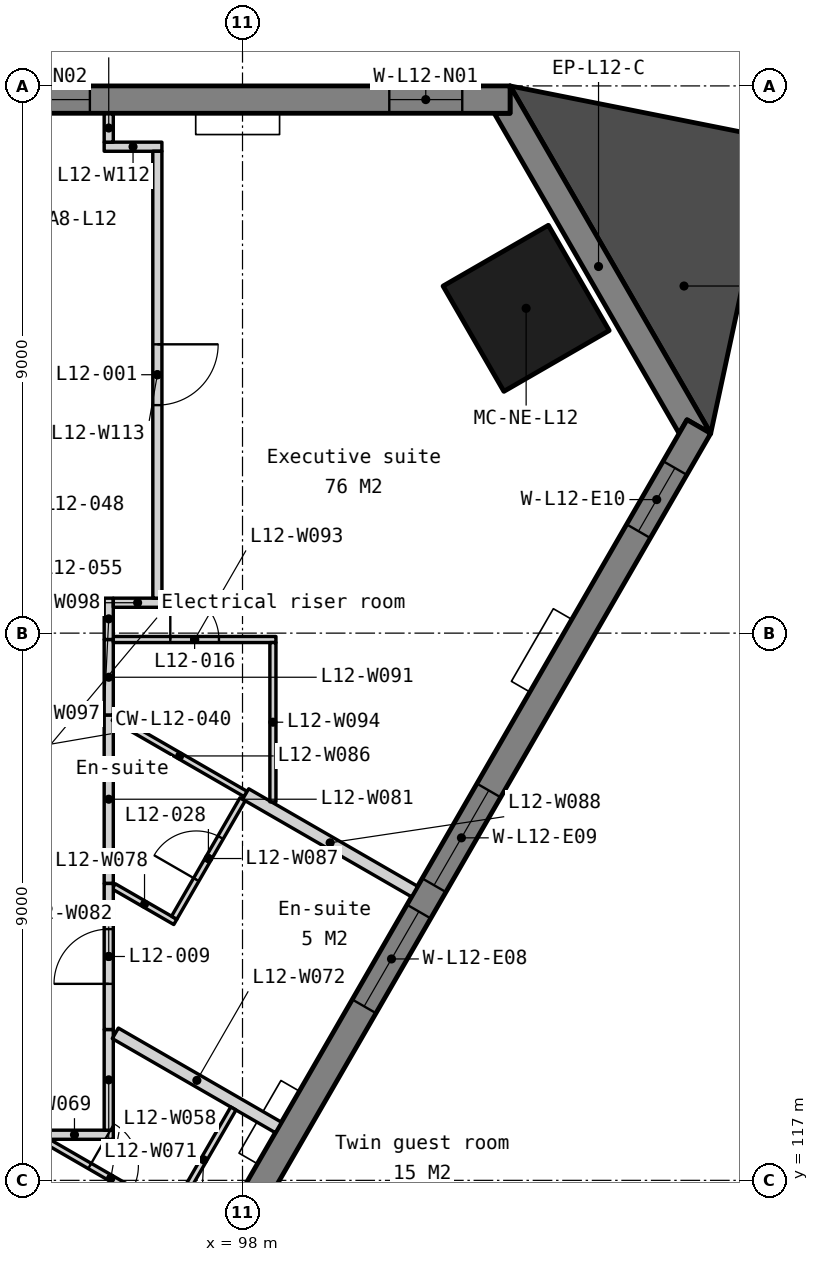
"""IFC4 building model, lengths in metres.
Left out: names, types, materials, properties, quantities, classifications, styles, units other than length and angle.
Written with IfcOpenShell. Run it as: python <this file> out.ifc"""

import sys

from ifc_helpers import new_model, si_unit, direction, frame, frame_2d, origin, origin_2d, place, context, subcontext, project, spatial, polyline, rectangle, outline, extrude, element, fill, save


model = new_model("IFC4")
c1 = context("Model", 3, precision=1e-05, world=origin(), true_north=direction((0.0, 1.0)))
c2 = subcontext(c1, "Body", "Model", "MODEL_VIEW")
j1 = project(units=[si_unit("LENGTHUNIT", "METRE"), si_unit("PLANEANGLEUNIT", "RADIAN")], contexts=[c1])
p1 = place(None, origin())
s1 = spatial("IfcSite", under=j1, at=p1, CompositionType="ELEMENT")
p2 = place(p1, origin())
s2 = spatial("IfcBuilding", under=s1, at=p2, CompositionType="ELEMENT")
p3 = place(p2, frame((0.0, 0.0, 56.0)))
s3 = spatial("IfcBuildingStorey", under=s2, at=p3, CompositionType="ELEMENT", Elevation=56.0)
p4 = place(p3, frame((102.664, 131.342, 0.0), z_axis=(0.0, 0.0, 1.0), x_axis=(-0.5, 0.866025403784, 0.0)))
e1 = element("IfcColumn", 1, at=p4, inside=s3, PredefinedType="COLUMN", context=c2, shape_type="SweptSolid", body=[
    extrude(rectangle(XDim=2.0, YDim=2.0, at=origin_2d()), origin(), (0.0, 0.0, 1.0), 3.5),
])
p5 = place(p3, frame((0.0, 0.0, -0.15)))
e2 = element("IfcWall", 2, at=p5, inside=s3, PredefinedType="SOLIDWALL", context=c2, shape_type="SweptSolid", body=[
    extrude(outline(polyline([(105.7, 129.284), (105.31, 129.509), (105.18, 129.284), (102.14, 134.55), (102.4, 134.55), (102.4, 135.0), (105.7, 129.284)])), origin(), (0.0, 0.0, 1.0), 3.5),
])
p6 = place(p3, frame((102.4, 134.775, -0.15), z_axis=(0.0, 0.0, 1.0), x_axis=(-1.0, 0.0, 0.0)))
e3 = element("IfcWall", 3, at=p6, inside=s3, PredefinedType="SOLIDWALL", context=c2, shape_type="SweptSolid", body=[
    extrude(outline(polyline([(44.8, 0.0), (44.8, 3.5), (0.0, 3.5), (0.0, 0.0), (44.8, 0.0)])), frame((0.0, 0.225, 0.0), z_axis=(0.0, -1.0, 0.0), x_axis=(1.0, 0.0, 0.0)), (0.0, 0.0, 1.0), 0.45),
])
p7 = place(p6, frame((0.786, 0.0, 1.05)))
e4 = element("IfcOpeningElement", 4, at=p7, cuts=e3, PredefinedType="OPENING", context=c2, shape_type="SweptSolid", body=[
    extrude(rectangle(XDim=1.2, YDim=1.5, at=frame_2d((0.6, 0.75))), frame((0.0, 0.235, 0.0), z_axis=(0.0, -1.0, 0.0), x_axis=(1.0, 0.0, 0.0)), (0.0, 0.0, 1.0), 0.47),
])
p8 = place(p6, frame((6.91, 0.0, 1.05)))
e5 = element("IfcOpeningElement", 5, at=p8, cuts=e3, PredefinedType="OPENING", context=c2, shape_type="SweptSolid", body=[
    extrude(rectangle(XDim=1.8, YDim=1.5, at=frame_2d((0.9, 0.75))), frame((0.0, 0.235, 0.0), z_axis=(0.0, -1.0, 0.0), x_axis=(1.0, 0.0, 0.0)), (0.0, 0.0, 1.0), 0.47),
])
p9 = place(p6, frame((9.21, 0.0, 1.05)))
e6 = element("IfcOpeningElement", 6, at=p9, cuts=e3, PredefinedType="OPENING", context=c2, shape_type="SweptSolid", body=[
    extrude(rectangle(XDim=1.8, YDim=1.5, at=frame_2d((0.9, 0.75))), frame((0.0, 0.235, 0.0), z_axis=(0.0, -1.0, 0.0), x_axis=(1.0, 0.0, 0.0)), (0.0, 0.0, 1.0), 0.47),
])
p10 = place(p6, frame((15.87, 0.0, 1.05)))
e7 = element("IfcOpeningElement", 7, at=p10, cuts=e3, PredefinedType="OPENING", context=c2, shape_type="SweptSolid", body=[
    extrude(rectangle(XDim=1.8, YDim=1.5, at=frame_2d((0.9, 0.75))), frame((0.0, 0.235, 0.0), z_axis=(0.0, -1.0, 0.0), x_axis=(1.0, 0.0, 0.0)), (0.0, 0.0, 1.0), 0.47),
])
p11 = place(p6, frame((18.17, 0.0, 1.05)))
e8 = element("IfcOpeningElement", 8, at=p11, cuts=e3, PredefinedType="OPENING", context=c2, shape_type="SweptSolid", body=[
    extrude(rectangle(XDim=1.8, YDim=1.5, at=frame_2d((0.9, 0.75))), frame((0.0, 0.235, 0.0), z_axis=(0.0, -1.0, 0.0), x_axis=(1.0, 0.0, 0.0)), (0.0, 0.0, 1.0), 0.47),
])
p12 = place(p6, frame((24.83, 0.0, 1.05)))
e9 = element("IfcOpeningElement", 9, at=p12, cuts=e3, PredefinedType="OPENING", context=c2, shape_type="SweptSolid", body=[
    extrude(rectangle(XDim=1.8, YDim=1.5, at=frame_2d((0.9, 0.75))), frame((0.0, 0.235, 0.0), z_axis=(0.0, -1.0, 0.0), x_axis=(1.0, 0.0, 0.0)), (0.0, 0.0, 1.0), 0.47),
])
p13 = place(p6, frame((27.13, 0.0, 1.05)))
e10 = element("IfcOpeningElement", 10, at=p13, cuts=e3, PredefinedType="OPENING", context=c2, shape_type="SweptSolid", body=[
    extrude(rectangle(XDim=1.8, YDim=1.5, at=frame_2d((0.9, 0.75))), frame((0.0, 0.235, 0.0), z_axis=(0.0, -1.0, 0.0), x_axis=(1.0, 0.0, 0.0)), (0.0, 0.0, 1.0), 0.47),
])
p14 = place(p6, frame((33.79, 0.0, 1.05)))
e11 = element("IfcOpeningElement", 11, at=p14, cuts=e3, PredefinedType="OPENING", context=c2, shape_type="SweptSolid", body=[
    extrude(rectangle(XDim=1.8, YDim=1.5, at=frame_2d((0.9, 0.75))), frame((0.0, 0.235, 0.0), z_axis=(0.0, -1.0, 0.0), x_axis=(1.0, 0.0, 0.0)), (0.0, 0.0, 1.0), 0.47),
])
p15 = place(p6, frame((36.09, 0.0, 1.05)))
e12 = element("IfcOpeningElement", 12, at=p15, cuts=e3, PredefinedType="OPENING", context=c2, shape_type="SweptSolid", body=[
    extrude(rectangle(XDim=1.8, YDim=1.5, at=frame_2d((0.9, 0.75))), frame((0.0, 0.235, 0.0), z_axis=(0.0, -1.0, 0.0), x_axis=(1.0, 0.0, 0.0)), (0.0, 0.0, 1.0), 0.47),
])
p16 = place(p6, frame((42.814, 0.0, 1.05)))
e13 = element("IfcOpeningElement", 13, at=p16, cuts=e3, PredefinedType="OPENING", context=c2, shape_type="SweptSolid", body=[
    extrude(rectangle(XDim=1.2, YDim=1.5, at=frame_2d((0.6, 0.75))), frame((0.0, 0.235, 0.0), z_axis=(0.0, -1.0, 0.0), x_axis=(1.0, 0.0, 0.0)), (0.0, 0.0, 1.0), 0.47),
])
p17 = place(p3, frame((83.105, 90.599, -0.15), z_axis=(0.0, 0.0, 1.0), x_axis=(0.499999201451, 0.866025864826, 0.0)))
e14 = element("IfcWall", 14, at=p17, inside=s3, PredefinedType="SOLIDWALL", context=c2, shape_type="SweptSolid", body=[
    extrude(outline(polyline([(44.8, 0.0), (44.8, 3.5), (0.0, 3.5), (0.0, 0.0), (44.8, 0.0)])), frame((0.0, 0.225, 0.0), z_axis=(0.0, -1.0, 0.0), x_axis=(1.0, 0.0, 0.0)), (0.0, 0.0, 1.0), 0.45),
])
p18 = place(p17, frame((0.786, 0.0, 1.05)))
e15 = element("IfcOpeningElement", 15, at=p18, cuts=e14, PredefinedType="OPENING", context=c2, shape_type="SweptSolid", body=[
    extrude(rectangle(XDim=1.2, YDim=1.5, at=frame_2d((0.6, 0.75))), frame((0.0, 0.235, 0.0), z_axis=(0.0, -1.0, 0.0), x_axis=(1.0, 0.0, 0.0)), (0.0, 0.0, 1.0), 0.47),
])
p19 = place(p17, frame((6.91, 0.0, 1.05)))
e16 = element("IfcOpeningElement", 16, at=p19, cuts=e14, PredefinedType="OPENING", context=c2, shape_type="SweptSolid", body=[
    extrude(rectangle(XDim=1.8, YDim=1.5, at=frame_2d((0.9, 0.75))), frame((0.0, 0.235, 0.0), z_axis=(0.0, -1.0, 0.0), x_axis=(1.0, 0.0, 0.0)), (0.0, 0.0, 1.0), 0.47),
])
p20 = place(p17, frame((9.21, 0.0, 1.05)))
e17 = element("IfcOpeningElement", 17, at=p20, cuts=e14, PredefinedType="OPENING", context=c2, shape_type="SweptSolid", body=[
    extrude(rectangle(XDim=1.8, YDim=1.5, at=frame_2d((0.9, 0.75))), frame((0.0, 0.235, 0.0), z_axis=(0.0, -1.0, 0.0), x_axis=(1.0, 0.0, 0.0)), (0.0, 0.0, 1.0), 0.47),
])
p21 = place(p17, frame((15.87, 0.0, 1.05)))
e18 = element("IfcOpeningElement", 18, at=p21, cuts=e14, PredefinedType="OPENING", context=c2, shape_type="SweptSolid", body=[
    extrude(rectangle(XDim=1.8, YDim=1.5, at=frame_2d((0.9, 0.75))), frame((0.0, 0.235, 0.0), z_axis=(0.0, -1.0, 0.0), x_axis=(1.0, 0.0, 0.0)), (0.0, 0.0, 1.0), 0.47),
])
p22 = place(p17, frame((18.17, 0.0, 1.05)))
e19 = element("IfcOpeningElement", 19, at=p22, cuts=e14, PredefinedType="OPENING", context=c2, shape_type="SweptSolid", body=[
    extrude(rectangle(XDim=1.8, YDim=1.5, at=frame_2d((0.9, 0.75))), frame((0.0, 0.235, 0.0), z_axis=(0.0, -1.0, 0.0), x_axis=(1.0, 0.0, 0.0)), (0.0, 0.0, 1.0), 0.47),
])
p23 = place(p17, frame((24.83, 0.0, 1.05)))
e20 = element("IfcOpeningElement", 20, at=p23, cuts=e14, PredefinedType="OPENING", context=c2, shape_type="SweptSolid", body=[
    extrude(rectangle(XDim=1.8, YDim=1.5, at=frame_2d((0.9, 0.75))), frame((0.0, 0.235, 0.0), z_axis=(0.0, -1.0, 0.0), x_axis=(1.0, 0.0, 0.0)), (0.0, 0.0, 1.0), 0.47),
])
p24 = place(p17, frame((27.13, 0.0, 1.05)))
e21 = element("IfcOpeningElement", 21, at=p24, cuts=e14, PredefinedType="OPENING", context=c2, shape_type="SweptSolid", body=[
    extrude(rectangle(XDim=1.8, YDim=1.5, at=frame_2d((0.9, 0.75))), frame((0.0, 0.235, 0.0), z_axis=(0.0, -1.0, 0.0), x_axis=(1.0, 0.0, 0.0)), (0.0, 0.0, 1.0), 0.47),
])
p25 = place(p17, frame((33.79, 0.0, 1.05)))
e22 = element("IfcOpeningElement", 22, at=p25, cuts=e14, PredefinedType="OPENING", context=c2, shape_type="SweptSolid", body=[
    extrude(rectangle(XDim=1.8, YDim=1.5, at=frame_2d((0.9, 0.75))), frame((0.0, 0.235, 0.0), z_axis=(0.0, -1.0, 0.0), x_axis=(1.0, 0.0, 0.0)), (0.0, 0.0, 1.0), 0.47),
])
p26 = place(p17, frame((36.09, 0.0, 1.05)))
e23 = element("IfcOpeningElement", 23, at=p26, cuts=e14, PredefinedType="OPENING", context=c2, shape_type="SweptSolid", body=[
    extrude(rectangle(XDim=1.8, YDim=1.5, at=frame_2d((0.9, 0.75))), frame((0.0, 0.235, 0.0), z_axis=(0.0, -1.0, 0.0), x_axis=(1.0, 0.0, 0.0)), (0.0, 0.0, 1.0), 0.47),
])
p27 = place(p17, frame((42.814, 0.0, 1.05)))
e24 = element("IfcOpeningElement", 24, at=p27, cuts=e14, PredefinedType="OPENING", context=c2, shape_type="SweptSolid", body=[
    extrude(rectangle(XDim=1.2, YDim=1.5, at=frame_2d((0.6, 0.75))), frame((0.0, 0.235, 0.0), z_axis=(0.0, -1.0, 0.0), x_axis=(1.0, 0.0, 0.0)), (0.0, 0.0, 1.0), 0.47),
])
p28 = place(p3, frame((0.0, 0.0, -0.15)))
e25 = element("IfcWall", 25, at=p28, inside=s3, PredefinedType="SOLIDWALL", context=c2, shape_type="SweptSolid", body=[
    extrude(outline(polyline([(105.7, 129.284), (106.744, 134.134), (102.4, 135.0), (105.7, 129.284)])), origin(), (0.0, 0.0, 1.0), 3.5),
])
p29 = place(p3, frame((94.775, 117.647, 0.0), z_axis=(0.0, 0.0, 1.0), x_axis=(0.86604092097, -0.499973122483, 0.0)))
e26 = element("IfcWall", 26, at=p29, inside=s3, PredefinedType="PARTITIONING", context=c2, shape_type="SweptSolid", body=[
    extrude(rectangle(XDim=2.445, YDim=0.1, at=frame_2d((1.223, 0.0))), origin(), (0.0, 0.0, 1.0), 3.35),
])
p30 = place(p29, frame((0.823, 0.0, 0.0)))
e27 = element("IfcOpeningElement", 27, at=p30, cuts=e26, PredefinedType="OPENING", context=c2, shape_type="SweptSolid", body=[
    extrude(rectangle(XDim=0.8, YDim=2.1, at=frame_2d((0.4, 1.05))), frame((0.0, 0.06, 0.0), z_axis=(0.0, -1.0, 0.0), x_axis=(1.0, 0.0, 0.0)), (0.0, 0.0, 1.0), 0.12),
])
p31 = place(p3, frame((94.598, 117.75, 0.0), z_axis=(0.0, 0.0, 1.0), x_axis=(1.0, 0.0, 0.0)))
e28 = element("IfcWall", 28, at=p31, inside=s3, PredefinedType="PARTITIONING", context=c2, shape_type="SweptSolid", body=[
    extrude(rectangle(XDim=1.277, YDim=0.15, at=frame_2d((0.639, 0.0))), origin(), (0.0, 0.0, 1.0), 3.35),
])
p32 = place(p3, frame((95.8, 117.825, 0.0), z_axis=(0.0, 0.0, 1.0), x_axis=(0.0, 1.0, 0.0)))
e29 = element("IfcWall", 29, at=p32, inside=s3, PredefinedType="PARTITIONING", context=c2, shape_type="SweptSolid", body=[
    extrude(rectangle(XDim=1.656, YDim=0.15, at=frame_2d((0.828, 0.0))), origin(), (0.0, 0.0, 1.0), 3.35),
])
p33 = place(p3, frame((95.908, 119.418, 0.0), z_axis=(0.0, 0.0, 1.0), x_axis=(0.866051688794, -0.499954470265, 0.0)))
e30 = element("IfcWall", 30, at=p33, inside=s3, PredefinedType="PARTITIONING", context=c2, shape_type="SweptSolid", body=[
    extrude(rectangle(XDim=3.097, YDim=0.2, at=frame_2d((1.548, 0.0))), origin(), (0.0, 0.0, 1.0), 3.35),
])
p34 = place(p3, frame((96.875, 116.493, 0.0), z_axis=(0.0, 0.0, 1.0), x_axis=(0.500043961785, 0.866000020948, 0.0)))
e31 = element("IfcWall", 31, at=p34, inside=s3, PredefinedType="PARTITIONING", context=c2, shape_type="SweptSolid", body=[
    extrude(rectangle(XDim=1.95, YDim=0.1, at=frame_2d((0.975, 0.0))), origin(), (0.0, 0.0, 1.0), 3.35),
])
p35 = place(p3, frame((95.882, 121.835, 0.0), z_axis=(0.0, 0.0, 1.0), x_axis=(0.86601174498, -0.500023656998, 0.0)))
e32 = element("IfcWall", 32, at=p35, inside=s3, PredefinedType="PARTITIONING", context=c2, shape_type="SweptSolid", body=[
    extrude(rectangle(XDim=1.169, YDim=0.1, at=frame_2d((0.585, 0.0))), origin(), (0.0, 0.0, 1.0), 3.35),
])
p36 = place(p3, frame((95.8, 121.883, 0.0), z_axis=(0.0, 0.0, 1.0), x_axis=(0.0, 1.0, 0.0)))
e33 = element("IfcWall", 33, at=p36, inside=s3, PredefinedType="PARTITIONING", context=c2, shape_type="SweptSolid", body=[
    extrude(rectangle(XDim=2.771, YDim=0.15, at=frame_2d((1.386, 0.0))), origin(), (0.0, 0.0, 1.0), 3.35),
])
p37 = place(p3, frame((95.8, 119.481, 0.0), z_axis=(0.0, 0.0, 1.0), x_axis=(0.0, 1.0, 0.0)))
e34 = element("IfcWall", 34, at=p37, inside=s3, PredefinedType="PARTITIONING", context=c2, shape_type="SweptSolid", body=[
    extrude(rectangle(XDim=2.402, YDim=0.15, at=frame_2d((1.201, 0.0))), origin(), (0.0, 0.0, 1.0), 3.35),
])
p38 = place(p37, frame((0.751, 0.0, 0.0)))
e35 = element("IfcOpeningElement", 35, at=p38, cuts=e34, PredefinedType="OPENING", context=c2, shape_type="SweptSolid", body=[
    extrude(rectangle(XDim=0.9, YDim=2.1, at=frame_2d((0.45, 1.05))), frame((0.0, 0.085, 0.0), z_axis=(0.0, -1.0, 0.0), x_axis=(1.0, 0.0, 0.0)), (0.0, 0.0, 1.0), 0.17),
])
p39 = place(p3, frame((95.882, 124.606, 0.0), z_axis=(0.0, 0.0, 1.0), x_axis=(0.866039519639, -0.499975549825, 0.0)))
e36 = element("IfcWall", 36, at=p39, inside=s3, PredefinedType="PARTITIONING", context=c2, shape_type="SweptSolid", body=[
    extrude(rectangle(XDim=2.505, YDim=0.1, at=frame_2d((1.252, 0.0))), origin(), (0.0, 0.0, 1.0), 3.35),
])
p40 = place(p3, frame((96.877, 121.319, 0.0), z_axis=(0.0, 0.0, 1.0), x_axis=(0.499966648284, 0.866044658551, 0.0)))
e37 = element("IfcWall", 37, at=p40, inside=s3, PredefinedType="PARTITIONING", context=c2, shape_type="SweptSolid", body=[
    extrude(rectangle(XDim=2.25, YDim=0.1, at=frame_2d((1.125, 0.0))), origin(), (0.0, 0.0, 1.0), 3.35),
])
p41 = place(p40, frame((0.725, 0.0, 0.0)))
e38 = element("IfcOpeningElement", 38, at=p41, cuts=e37, PredefinedType="OPENING", context=c2, shape_type="SweptSolid", body=[
    extrude(rectangle(XDim=0.8, YDim=2.1, at=frame_2d((0.4, 1.05))), frame((0.0, 0.06, 0.0), z_axis=(0.0, -1.0, 0.0), x_axis=(1.0, 0.0, 0.0)), (0.0, 0.0, 1.0), 0.12),
])
p42 = place(p3, frame((98.052, 123.354, 0.0), z_axis=(0.0, 0.0, 1.0), x_axis=(0.866019585306, -0.500010077765, 0.0)))
e39 = element("IfcWall", 39, at=p42, inside=s3, PredefinedType="PARTITIONING", context=c2, shape_type="SweptSolid", body=[
    extrude(rectangle(XDim=3.208, YDim=0.2, at=frame_2d((1.604, 0.0))), origin(), (0.0, 0.0, 1.0), 3.35),
])
p43 = place(p3, frame((95.8, 124.654, 0.0), z_axis=(0.0, 0.0, 1.0), x_axis=(0.0, 1.0, 0.0)))
e40 = element("IfcWall", 40, at=p43, inside=s3, PredefinedType="PARTITIONING", context=c2, shape_type="SweptSolid", body=[
    extrude(rectangle(XDim=1.241, YDim=0.15, at=frame_2d((0.621, 0.0))), origin(), (0.0, 0.0, 1.0), 3.35),
])
p44 = place(p3, frame((95.875, 125.895, 0.0), z_axis=(0.0, 0.0, 1.0), x_axis=(1.0, 0.0, 0.0)))
e41 = element("IfcWall", 41, at=p44, inside=s3, PredefinedType="PARTITIONING", context=c2, shape_type="SweptSolid", body=[
    extrude(rectangle(XDim=2.675, YDim=0.1, at=frame_2d((1.337, 0.0))), origin(), (0.0, 0.0, 1.0), 3.35),
])
p45 = place(p44, frame((0.938, 0.0, 0.0)))
e42 = element("IfcOpeningElement", 42, at=p45, cuts=e41, PredefinedType="OPENING", context=c2, shape_type="SweptSolid", body=[
    extrude(rectangle(XDim=0.8, YDim=2.1, at=frame_2d((0.4, 1.05))), frame((0.0, 0.06, 0.0), z_axis=(0.0, -1.0, 0.0), x_axis=(1.0, 0.0, 0.0)), (0.0, 0.0, 1.0), 0.12),
])
p46 = place(p3, frame((98.5, 123.225, 0.0), z_axis=(0.0, 0.0, 1.0), x_axis=(0.0, 1.0, 0.0)))
e43 = element("IfcWall", 43, at=p46, inside=s3, PredefinedType="PARTITIONING", context=c2, shape_type="SweptSolid", body=[
    extrude(rectangle(XDim=2.62, YDim=0.1, at=frame_2d((1.31, 0.0))), origin(), (0.0, 0.0, 1.0), 3.35),
])
p47 = place(p3, frame((95.8, 125.895, 0.0), z_axis=(0.0, 0.0, 1.0), x_axis=(0.0, 1.0, 0.0)))
e44 = element("IfcWall", 44, at=p47, inside=s3, PredefinedType="PARTITIONING", context=c2, shape_type="SweptSolid", body=[
    extrude(rectangle(XDim=0.68, YDim=0.15, at=frame_2d((0.34, 0.0))), origin(), (0.0, 0.0, 1.0), 3.35),
])
p48 = place(p3, frame((95.875, 126.5, 0.0), z_axis=(0.0, 0.0, 1.0), x_axis=(1.0, 0.0, 0.0)))
e45 = element("IfcWall", 45, at=p48, inside=s3, PredefinedType="PARTITIONING", context=c2, shape_type="SweptSolid", body=[
    extrude(rectangle(XDim=0.8, YDim=0.15, at=frame_2d((0.4, 0.0))), origin(), (0.0, 0.0, 1.0), 3.35),
])
p49 = place(p3, frame((95.725, 134.0, 0.0), z_axis=(0.0, 0.0, 1.0), x_axis=(1.0, 0.0, 0.0)))
e46 = element("IfcWall", 46, at=p49, inside=s3, PredefinedType="PARTITIONING", context=c2, shape_type="SweptSolid", body=[
    extrude(rectangle(XDim=0.949, YDim=0.15, at=frame_2d((0.475, 0.0))), origin(), (0.0, 0.0, 1.0), 2.887),
])
p50 = place(p3, frame((96.6, 133.925, 0.0), z_axis=(0.0, 0.0, 1.0), x_axis=(6.643194e-05, -0.999999997793, 0.0)))
e47 = element("IfcWall", 47, at=p50, inside=s3, PredefinedType="PARTITIONING", context=c2, shape_type="SweptSolid", body=[
    extrude(rectangle(XDim=7.35, YDim=0.15, at=frame_2d((3.675, 0.0))), origin(), (0.0, 0.0, 1.0), 3.35),
])
p51 = place(p50, frame((3.175, 0.0, 0.0)))
e48 = element("IfcOpeningElement", 48, at=p51, cuts=e47, PredefinedType="OPENING", context=c2, shape_type="SweptSolid", body=[
    extrude(rectangle(XDim=1.0, YDim=2.1, at=frame_2d((0.5, 1.05))), frame((0.0, 0.085, 0.0), z_axis=(0.0, -1.0, 0.0), x_axis=(1.0, 0.0, 0.0)), (0.0, 0.0, 1.0), 0.17),
])
p52 = place(p3, frame((95.8, 134.075, 0.0), z_axis=(0.0, 0.0, 1.0), x_axis=(0.0, 1.0, 0.0)))
e49 = element("IfcWall", 49, at=p52, inside=s3, PredefinedType="PARTITIONING", context=c2, shape_type="SweptSolid", body=[
    extrude(rectangle(XDim=0.465, YDim=0.15, at=frame_2d((0.232, 0.0))), origin(), (0.0, 0.0, 1.0), 3.35),
])
p53 = place(p7, origin())
e50 = element("IfcWindow", 50, at=p53, inside=s3, PartitioningType="SINGLE_PANEL", PredefinedType="WINDOW", context=c2, shape_type="SweptSolid", body=[
    extrude(rectangle(XDim=1.2, YDim=1.5, at=frame_2d((0.6, 0.75))), frame((0.0, 0.03, 0.0), z_axis=(0.0, -1.0, 0.0), x_axis=(1.0, 0.0, 0.0)), (0.0, 0.0, 1.0), 0.06),
])
fill(e4, e50)
p54 = place(p8, origin())
e51 = element("IfcWindow", 51, at=p54, inside=s3, PartitioningType="SINGLE_PANEL", PredefinedType="WINDOW", context=c2, shape_type="SweptSolid", body=[
    extrude(rectangle(XDim=1.8, YDim=1.5, at=frame_2d((0.9, 0.75))), frame((0.0, 0.03, 0.0), z_axis=(0.0, -1.0, 0.0), x_axis=(1.0, 0.0, 0.0)), (0.0, 0.0, 1.0), 0.06),
])
fill(e5, e51)
p55 = place(p25, origin())
e52 = element("IfcWindow", 52, at=p55, inside=s3, PartitioningType="SINGLE_PANEL", PredefinedType="WINDOW", context=c2, shape_type="SweptSolid", body=[
    extrude(rectangle(XDim=1.8, YDim=1.5, at=frame_2d((0.9, 0.75))), frame((0.0, 0.03, 0.0), z_axis=(0.0, -1.0, 0.0), x_axis=(1.0, 0.0, 0.0)), (0.0, 0.0, 1.0), 0.06),
])
fill(e22, e52)
p56 = place(p26, origin())
e53 = element("IfcWindow", 53, at=p56, inside=s3, PartitioningType="SINGLE_PANEL", PredefinedType="WINDOW", context=c2, shape_type="SweptSolid", body=[
    extrude(rectangle(XDim=1.8, YDim=1.5, at=frame_2d((0.9, 0.75))), frame((0.0, 0.03, 0.0), z_axis=(0.0, -1.0, 0.0), x_axis=(1.0, 0.0, 0.0)), (0.0, 0.0, 1.0), 0.06),
])
fill(e23, e53)
p57 = place(p27, origin())
e54 = element("IfcWindow", 54, at=p57, inside=s3, PartitioningType="SINGLE_PANEL", PredefinedType="WINDOW", context=c2, shape_type="SweptSolid", body=[
    extrude(rectangle(XDim=1.2, YDim=1.5, at=frame_2d((0.6, 0.75))), frame((0.0, 0.03, 0.0), z_axis=(0.0, -1.0, 0.0), x_axis=(1.0, 0.0, 0.0)), (0.0, 0.0, 1.0), 0.06),
])
fill(e24, e54)
p58 = place(p51, origin())
e55 = element("IfcDoor", 55, at=p58, inside=s3, OperationType="SINGLE_SWING_LEFT", PredefinedType="DOOR", context=c2, shape_type="SweptSolid", body=[
    extrude(rectangle(XDim=1.0, YDim=2.1, at=frame_2d((0.5, 1.05))), frame((0.0, 0.025, 0.0), z_axis=(0.0, -1.0, 0.0), x_axis=(1.0, 0.0, 0.0)), (0.0, 0.0, 1.0), 0.05),
])
fill(e48, e55)
p59 = place(p38, origin())
e56 = element("IfcDoor", 56, at=p59, inside=s3, OperationType="SINGLE_SWING_LEFT", PredefinedType="DOOR", context=c2, shape_type="SweptSolid", body=[
    extrude(rectangle(XDim=0.9, YDim=2.1, at=frame_2d((0.45, 1.05))), frame((0.0, 0.025, 0.0), z_axis=(0.0, -1.0, 0.0), x_axis=(1.0, 0.0, 0.0)), (0.0, 0.0, 1.0), 0.05),
])
fill(e35, e56)
p60 = place(p45, origin())
e57 = element("IfcDoor", 57, at=p60, inside=s3, OperationType="SINGLE_SWING_LEFT", PredefinedType="DOOR", context=c2, shape_type="SweptSolid", body=[
    extrude(rectangle(XDim=0.8, YDim=2.1, at=frame_2d((0.4, 1.05))), frame((0.0, 0.025, 0.0), z_axis=(0.0, -1.0, 0.0), x_axis=(1.0, 0.0, 0.0)), (0.0, 0.0, 1.0), 0.05),
])
fill(e42, e57)
p61 = place(p30, origin())
e58 = element("IfcDoor", 58, at=p61, inside=s3, OperationType="SINGLE_SWING_LEFT", PredefinedType="DOOR", context=c2, shape_type="SweptSolid", body=[
    extrude(rectangle(XDim=0.8, YDim=2.1, at=frame_2d((0.4, 1.05))), frame((0.0, 0.025, 0.0), z_axis=(0.0, -1.0, 0.0), x_axis=(1.0, 0.0, 0.0)), (0.0, 0.0, 1.0), 0.05),
])
fill(e27, e58)
p62 = place(p41, origin())
e59 = element("IfcDoor", 59, at=p62, inside=s3, OperationType="SINGLE_SWING_LEFT", PredefinedType="DOOR", context=c2, shape_type="SweptSolid", body=[
    extrude(rectangle(XDim=0.8, YDim=2.1, at=frame_2d((0.4, 1.05))), frame((0.0, 0.025, 0.0), z_axis=(0.0, -1.0, 0.0), x_axis=(1.0, 0.0, 0.0)), (0.0, 0.0, 1.0), 0.05),
])
fill(e38, e59)
save(model, sys.argv[1])
